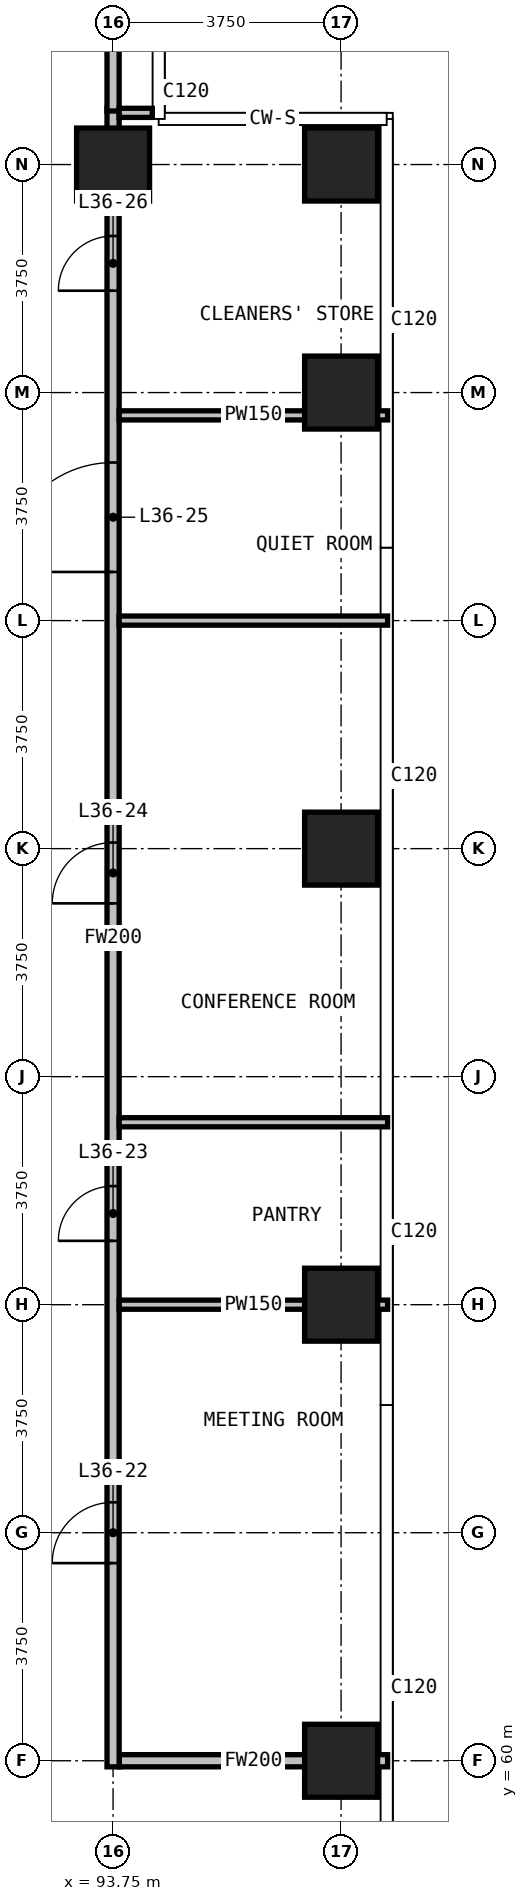
"""IFC4 building model, lengths in metres.
Left out: names, types, materials, properties, quantities, classifications, styles, units other than length and angle.
Written with IfcOpenShell. Run it as: python <this file> out.ifc"""

import sys

from ifc_helpers import new_model, si_unit, direction, frame, frame_2d, origin, origin_2d, place, context, subcontext, project, spatial, rectangle, extrude, element, fill, save


model = new_model("IFC4")
c1 = context("Model", 3, precision=1e-05, world=origin(), true_north=direction((0.0, 1.0)))
c2 = subcontext(c1, "Body", "Model", "MODEL_VIEW")
j1 = project(units=[si_unit("LENGTHUNIT", "METRE"), si_unit("PLANEANGLEUNIT", "RADIAN")], contexts=[c1])
p1 = place(None, origin())
s1 = spatial("IfcSite", under=j1, at=p1, CompositionType="ELEMENT")
p2 = place(p1, origin())
s2 = spatial("IfcBuilding", under=s1, at=p2, CompositionType="ELEMENT")
p3 = place(p2, frame((0.0, 0.0, 143.2)))
s3 = spatial("IfcBuildingStorey", under=s2, at=p3, CompositionType="ELEMENT", Elevation=143.2)
for number, where, z_axis, x_axis in (
    (1, (93.75, 86.25, 0.0), (0.0, 0.0, 1.0), (1.0, 0.0, 0.0)),
    (2, (97.5, 60.0, 0.0), (0.0, 0.0, 1.0), (1.0, 0.0, 0.0)),
    (3, (97.5, 67.5, 0.0), (0.0, 0.0, 1.0), (1.0, 0.0, 0.0)),
    (4, (97.5, 75.0, 0.0), (0.0, 0.0, 1.0), (1.0, 0.0, 0.0)),
    (5, (97.5, 82.5, 0.0), (0.0, 0.0, 1.0), (1.0, 0.0, 0.0)),
    (6, (97.5, 86.25, 0.0), (0.0, 0.0, 1.0), (1.0, 0.0, 0.0)),
):
    element("IfcColumn", number, at=place(p3, frame(where, z_axis=z_axis, x_axis=x_axis)), inside=s3, PredefinedType="COLUMN", context=c2, shape_type="SweptSolid", body=[
        extrude(rectangle(XDim=1.2, YDim=1.2, at=origin_2d()), origin(), (0.0, 0.0, 1.0), 4.5),
    ])
p4 = place(p3, frame((93.85, 60.0, 0.0), z_axis=(0.0, 0.0, 1.0), x_axis=(1.0, 0.0, 0.0)))
e7 = element("IfcWall", 7, at=p4, inside=s3, PredefinedType="PARTITIONING", context=c2, shape_type="SweptSolid", body=[
    extrude(rectangle(XDim=4.415, YDim=0.2, at=frame_2d((2.208, 0.0))), origin(), (0.0, 0.0, 1.0), 4.2),
])
p5 = place(p3, frame((93.75, 59.9, 0.0), z_axis=(0.0, 0.0, 1.0), x_axis=(0.0, 1.0, 0.0)))
e8 = element("IfcWall", 8, at=p5, inside=s3, PredefinedType="PARTITIONING", context=c2, shape_type="SweptSolid", body=[
    extrude(rectangle(XDim=27.275, YDim=0.2, at=frame_2d((13.638, 0.0))), origin(), (0.0, 0.0, 1.0), 4.2),
])
p6 = place(p5, frame((3.35, 0.0, 0.0)))
e9 = element("IfcOpeningElement", 9, at=p6, cuts=e8, PredefinedType="OPENING", context=c2, shape_type="SweptSolid", body=[
    extrude(rectangle(XDim=1.0, YDim=2.2, at=frame_2d((0.5, 1.1))), frame((0.0, 0.11, 0.0), z_axis=(0.0, -1.0, 0.0), x_axis=(1.0, 0.0, 0.0)), (0.0, 0.0, 1.0), 0.22),
])
p7 = place(p5, frame((8.65, 0.0, 0.0)))
e10 = element("IfcOpeningElement", 10, at=p7, cuts=e8, PredefinedType="OPENING", context=c2, shape_type="SweptSolid", body=[
    extrude(rectangle(XDim=0.9, YDim=2.2, at=frame_2d((0.45, 1.1))), frame((0.0, 0.11, 0.0), z_axis=(0.0, -1.0, 0.0), x_axis=(1.0, 0.0, 0.0)), (0.0, 0.0, 1.0), 0.22),
])
p8 = place(p5, frame((14.2, 0.0, 0.0)))
e11 = element("IfcOpeningElement", 11, at=p8, cuts=e8, PredefinedType="OPENING", context=c2, shape_type="SweptSolid", body=[
    extrude(rectangle(XDim=1.0, YDim=2.2, at=frame_2d((0.5, 1.1))), frame((0.0, 0.11, 0.0), z_axis=(0.0, -1.0, 0.0), x_axis=(1.0, 0.0, 0.0)), (0.0, 0.0, 1.0), 0.22),
])
p9 = place(p5, frame((19.65, 0.0, 0.0)))
e12 = element("IfcOpeningElement", 12, at=p9, cuts=e8, PredefinedType="OPENING", context=c2, shape_type="SweptSolid", body=[
    extrude(rectangle(XDim=1.8, YDim=2.2, at=frame_2d((0.9, 1.1))), frame((0.0, 0.11, 0.0), z_axis=(0.0, -1.0, 0.0), x_axis=(1.0, 0.0, 0.0)), (0.0, 0.0, 1.0), 0.22),
])
p10 = place(p5, frame((24.275, 0.0, 0.0)))
e13 = element("IfcOpeningElement", 13, at=p10, cuts=e8, PredefinedType="OPENING", context=c2, shape_type="SweptSolid", body=[
    extrude(rectangle(XDim=0.9, YDim=2.2, at=frame_2d((0.45, 1.1))), frame((0.0, 0.11, 0.0), z_axis=(0.0, -1.0, 0.0), x_axis=(1.0, 0.0, 0.0)), (0.0, 0.0, 1.0), 0.22),
])
p11 = place(p3, frame((93.75, 87.13, 0.0), z_axis=(0.0, 0.0, 1.0), x_axis=(0.0, 1.0, 0.0)))
e14 = element("IfcWall", 14, at=p11, inside=s3, PredefinedType="PARTITIONING", context=c2, shape_type="SweptSolid", body=[
    extrude(rectangle(XDim=3.515, YDim=0.2, at=frame_2d((1.758, 0.0))), origin(), (0.0, 0.0, 1.0), 4.2),
])
for number, where, z_axis, x_axis in (
    (15, (93.85, 67.5, 0.0), (0.0, 0.0, 1.0), (1.0, 0.0, 0.0)),
    (16, (93.85, 70.5, 0.0), (0.0, 0.0, 1.0), (1.0, 0.0, 0.0)),
    (17, (93.85, 78.75, 0.0), (0.0, 0.0, 1.0), (1.0, 0.0, 0.0)),
    (18, (93.85, 82.125, 0.0), (0.0, 0.0, 1.0), (1.0, 0.0, 0.0)),
):
    element("IfcWall", number, at=place(p3, frame(where, z_axis=z_axis, x_axis=x_axis)), inside=s3, PredefinedType="PARTITIONING", context=c2, shape_type="SweptSolid", body=[
        extrude(rectangle(XDim=4.415, YDim=0.15, at=frame_2d((2.208, 0.0))), origin(), (0.0, 0.0, 1.0), 4.2),
    ])
p12 = place(p3, frame((93.85, 87.1, 0.0), z_axis=(0.0, 0.0, 1.0), x_axis=(1.0, 0.0, 0.0)))
e19 = element("IfcWall", 19, at=p12, inside=s3, PredefinedType="PARTITIONING", context=c2, shape_type="SweptSolid", body=[
    extrude(rectangle(XDim=0.545, YDim=0.15, at=frame_2d((0.272, 0.0))), origin(), (0.0, 0.0, 1.0), 4.2),
])
p13 = place(p6, origin())
e20 = element("IfcDoor", 20, at=p13, inside=s3, OperationType="SINGLE_SWING_RIGHT", PredefinedType="DOOR", context=c2, shape_type="SweptSolid", body=[
    extrude(rectangle(XDim=1.0, YDim=2.2, at=frame_2d((0.5, 1.1))), frame((0.0, 0.025, 0.0), z_axis=(0.0, -1.0, 0.0), x_axis=(1.0, 0.0, 0.0)), (0.0, 0.0, 1.0), 0.05),
])
fill(e9, e20)
p14 = place(p7, origin())
e21 = element("IfcDoor", 21, at=p14, inside=s3, OperationType="SINGLE_SWING_LEFT", PredefinedType="DOOR", context=c2, shape_type="SweptSolid", body=[
    extrude(rectangle(XDim=0.9, YDim=2.2, at=frame_2d((0.45, 1.1))), frame((0.0, 0.025, 0.0), z_axis=(0.0, -1.0, 0.0), x_axis=(1.0, 0.0, 0.0)), (0.0, 0.0, 1.0), 0.05),
])
fill(e10, e21)
p15 = place(p8, origin())
e22 = element("IfcDoor", 22, at=p15, inside=s3, OperationType="SINGLE_SWING_RIGHT", PredefinedType="DOOR", context=c2, shape_type="SweptSolid", body=[
    extrude(rectangle(XDim=1.0, YDim=2.2, at=frame_2d((0.5, 1.1))), frame((0.0, 0.025, 0.0), z_axis=(0.0, -1.0, 0.0), x_axis=(1.0, 0.0, 0.0)), (0.0, 0.0, 1.0), 0.05),
])
fill(e11, e22)
p16 = place(p9, origin())
e23 = element("IfcDoor", 23, at=p16, inside=s3, OperationType="DOUBLE_DOOR_SINGLE_SWING", PredefinedType="DOOR", context=c2, shape_type="SweptSolid", body=[
    extrude(rectangle(XDim=1.8, YDim=2.2, at=frame_2d((0.9, 1.1))), frame((0.0, 0.025, 0.0), z_axis=(0.0, -1.0, 0.0), x_axis=(1.0, 0.0, 0.0)), (0.0, 0.0, 1.0), 0.05),
])
fill(e12, e23)
p17 = place(p10, origin())
e24 = element("IfcDoor", 24, at=p17, inside=s3, OperationType="SINGLE_SWING_LEFT", PredefinedType="DOOR", context=c2, shape_type="SweptSolid", body=[
    extrude(rectangle(XDim=0.9, YDim=2.2, at=frame_2d((0.45, 1.1))), frame((0.0, 0.025, 0.0), z_axis=(0.0, -1.0, 0.0), x_axis=(1.0, 0.0, 0.0)), (0.0, 0.0, 1.0), 0.05),
])
fill(e13, e24)
save(model, sys.argv[1])
